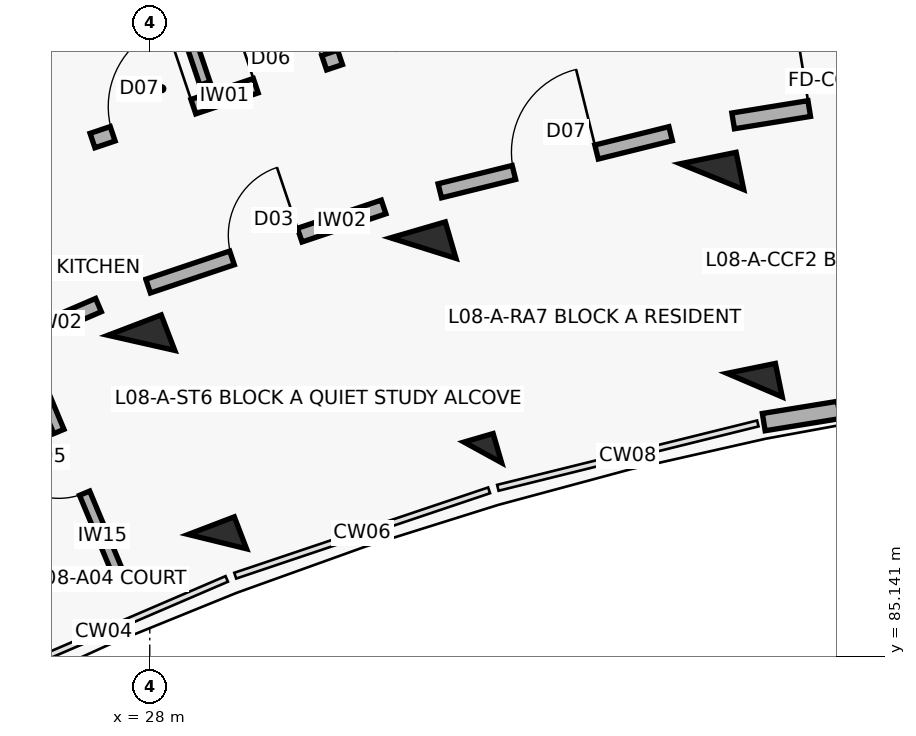
"""IFC4 building model, lengths in metres.
Left out: names, types, materials, properties, quantities, classifications, styles, units other than length and angle.
Written with IfcOpenShell. Run it as: python <this file> out.ifc"""

import sys

from ifc_helpers import new_model, si_unit, direction, frame, frame_2d, origin, origin_2d, place, context, subcontext, project, spatial, rectangle, extrude, element, fill, save


model = new_model("IFC4")
c1 = context("Model", 3, precision=1e-05, world=origin(), true_north=direction((0.0, 1.0)))
c2 = subcontext(c1, "Body", "Model", "MODEL_VIEW")
j1 = project(units=[si_unit("LENGTHUNIT", "METRE"), si_unit("PLANEANGLEUNIT", "RADIAN")], contexts=[c1])
p1 = place(None, origin())
s1 = spatial("IfcSite", under=j1, at=p1, CompositionType="ELEMENT")
p2 = place(p1, origin())
s2 = spatial("IfcBuilding", under=s1, at=p2, CompositionType="ELEMENT")
p3 = place(p2, frame((0.0, 0.0, 26.7)))
s3 = spatial("IfcBuildingStorey", under=s2, at=p3, CompositionType="ELEMENT", Elevation=26.7)
p4 = place(p3, frame((28.889, 86.646, 0.0), z_axis=(0.0, 0.0, 1.0), x_axis=(-0.357064076459, 0.934079892355, 0.0)))
e1 = element("IfcColumn", 1, at=p4, inside=s3, PredefinedType="COLUMN", context=c2, shape_type="SweptSolid", body=[
    extrude(rectangle(XDim=0.45, YDim=0.65, at=origin_2d()), origin(), (0.0, 0.0, 1.0), 3.1),
])
p5 = place(p3, frame((27.889, 89.261, 0.0), z_axis=(0.0, 0.0, 1.0), x_axis=(-0.357064076459, 0.934079892355, 0.0)))
e2 = element("IfcColumn", 2, at=p5, inside=s3, PredefinedType="COLUMN", context=c2, shape_type="SweptSolid", body=[
    extrude(rectangle(XDim=0.5, YDim=0.75, at=origin_2d()), origin(), (0.0, 0.0, 1.0), 3.1),
])
p6 = place(p3, frame((32.382, 87.82, 0.0), z_axis=(0.0, 0.0, 1.0), x_axis=(-0.27966144946, 0.96009867914, 0.0)))
e3 = element("IfcColumn", 3, at=p6, inside=s3, PredefinedType="COLUMN", context=c2, shape_type="SweptSolid", body=[
    extrude(rectangle(XDim=0.4, YDim=0.4, at=origin_2d()), origin(), (0.0, 0.0, 1.0), 3.1),
])
p7 = place(p3, frame((31.599, 90.508, 0.0), z_axis=(0.0, 0.0, 1.0), x_axis=(-0.27966144946, 0.96009867914, 0.0)))
e4 = element("IfcColumn", 4, at=p7, inside=s3, PredefinedType="COLUMN", context=c2, shape_type="SweptSolid", body=[
    extrude(rectangle(XDim=0.5, YDim=0.75, at=origin_2d()), origin(), (0.0, 0.0, 1.0), 3.1),
])
p8 = place(p3, frame((35.958, 88.705, 0.0), z_axis=(0.0, 0.0, 1.0), x_axis=(-0.200393999665, 0.979715389742, 0.0)))
e5 = element("IfcColumn", 5, at=p8, inside=s3, PredefinedType="COLUMN", context=c2, shape_type="SweptSolid", body=[
    extrude(rectangle(XDim=0.45, YDim=0.65, at=origin_2d()), origin(), (0.0, 0.0, 1.0), 3.1),
])
p9 = place(p3, frame((35.397, 91.448, 0.0), z_axis=(0.0, 0.0, 1.0), x_axis=(-0.200393999665, 0.979715389742, 0.0)))
e6 = element("IfcColumn", 6, at=p9, inside=s3, PredefinedType="COLUMN", context=c2, shape_type="SweptSolid", body=[
    extrude(rectangle(XDim=0.5, YDim=0.75, at=origin_2d()), origin(), (0.0, 0.0, 1.0), 3.1),
])
p10 = place(p3, frame((36.078, 88.218, 0.0), z_axis=(0.0, 0.0, 1.0), x_axis=(0.987080874485, 0.160222804952, 0.0)))
e7 = element("IfcWall", 7, at=p10, inside=s3, PredefinedType="SOLIDWALL", context=c2, shape_type="SweptSolid", body=[
    extrude(rectangle(XDim=3.604, YDim=0.23, at=frame_2d((1.802, 0.0))), origin(), (0.0, 0.0, 1.0), 2.25),
])
p11 = place(p10, frame((1.002, 0.0, 0.32)))
e8 = element("IfcOpeningElement", 8, at=p11, cuts=e7, PredefinedType="OPENING", context=c2, shape_type="SweptSolid", body=[
    extrude(rectangle(XDim=1.6, YDim=1.5, at=frame_2d((0.8, 0.75))), frame((0.0, 0.125, 0.0), z_axis=(0.0, -1.0, 0.0), x_axis=(1.0, 0.0, 0.0)), (0.0, 0.0, 1.0), 0.25),
])
p12 = place(p3, frame((24.322, 88.467, 0.0), z_axis=(0.0, 0.0, 1.0), x_axis=(0.918723391052, 0.394901672235, 0.0)))
e9 = element("IfcWall", 9, at=p12, inside=s3, PredefinedType="SOLIDWALL", context=c2, shape_type="SweptSolid", body=[
    extrude(rectangle(XDim=3.269, YDim=0.19, at=frame_2d((1.634, 0.0))), origin(), (0.0, 0.0, 1.0), 2.08),
])
p13 = place(p12, frame((1.174, 0.0, 0.0)))
e10 = element("IfcOpeningElement", 10, at=p13, cuts=e9, PredefinedType="OPENING", context=c2, shape_type="SweptSolid", body=[
    extrude(rectangle(XDim=0.92, YDim=2.1, at=frame_2d((0.46, 1.05))), frame((0.0, 0.105, 0.0), z_axis=(0.0, -1.0, 0.0), x_axis=(1.0, 0.0, 0.0)), (0.0, 0.0, 1.0), 0.21),
])
p14 = place(p3, frame((27.609, 86.166, 0.0), z_axis=(0.0, 0.0, 1.0), x_axis=(-0.385151143297, 0.922853507777, 0.0)))
e11 = element("IfcWall", 11, at=p14, inside=s3, PredefinedType="PARTITIONING", context=c2, shape_type="SweptSolid", body=[
    extrude(rectangle(XDim=3.3, YDim=0.145, at=frame_2d((1.65, 0.0))), origin(), (0.0, 0.0, 1.0), 2.08),
])
p15 = place(p14, frame((1.21, 0.0, 0.0)))
e12 = element("IfcOpeningElement", 12, at=p15, cuts=e11, PredefinedType="OPENING", context=c2, shape_type="SweptSolid", body=[
    extrude(rectangle(XDim=0.88, YDim=2.1, at=frame_2d((0.44, 1.05))), frame((0.0, 0.083, 0.0), z_axis=(0.0, -1.0, 0.0), x_axis=(1.0, 0.0, 0.0)), (0.0, 0.0, 1.0), 0.165),
])
p16 = place(p3, frame((27.247, 91.923, 0.0), z_axis=(0.0, 0.0, 1.0), x_axis=(0.947863007629, 0.318678080151, 0.0)))
e13 = element("IfcWall", 13, at=p16, inside=s3, PredefinedType="SOLIDWALL", context=c2, shape_type="SweptSolid", body=[
    extrude(rectangle(XDim=3.436, YDim=0.2, at=frame_2d((1.718, 0.0))), origin(), (0.0, 0.0, 1.0), 2.08),
])
p17 = place(p16, frame((0.28, 0.0, 0.0)))
e14 = element("IfcOpeningElement", 14, at=p17, cuts=e13, PredefinedType="OPENING", context=c2, shape_type="SweptSolid", body=[
    extrude(rectangle(XDim=1.12, YDim=2.15, at=frame_2d((0.56, 1.075))), frame((0.0, 0.11, 0.0), z_axis=(0.0, -1.0, 0.0), x_axis=(1.0, 0.0, 0.0)), (0.0, 0.0, 1.0), 0.22),
])
p18 = place(p16, frame((2.266, 0.0, 0.0)))
e15 = element("IfcOpeningElement", 15, at=p18, cuts=e13, PredefinedType="OPENING", context=c2, shape_type="SweptSolid", body=[
    extrude(rectangle(XDim=0.95, YDim=2.1, at=frame_2d((0.475, 1.05))), frame((0.0, 0.11, 0.0), z_axis=(0.0, -1.0, 0.0), x_axis=(1.0, 0.0, 0.0)), (0.0, 0.0, 1.0), 0.22),
])
p19 = place(p3, frame((27.979, 90.008, 0.0), z_axis=(0.0, 0.0, 1.0), x_axis=(0.94787351033, 0.318646839643, 0.0)))
e16 = element("IfcWall", 16, at=p19, inside=s3, PredefinedType="SOLIDWALL", context=c2, shape_type="SweptSolid", body=[
    extrude(rectangle(XDim=3.269, YDim=0.19, at=frame_2d((1.634, 0.0))), origin(), (0.0, 0.0, 1.0), 2.08),
])
p20 = place(p19, frame((1.164, 0.0, 0.0)))
e17 = element("IfcOpeningElement", 17, at=p20, cuts=e16, PredefinedType="OPENING", context=c2, shape_type="SweptSolid", body=[
    extrude(rectangle(XDim=0.94, YDim=2.1, at=frame_2d((0.47, 1.05))), frame((0.0, 0.105, 0.0), z_axis=(0.0, -1.0, 0.0), x_axis=(1.0, 0.0, 0.0)), (0.0, 0.0, 1.0), 0.21),
])
p21 = place(p3, frame((28.725, 92.675, 0.0), z_axis=(0.0, 0.0, 1.0), x_axis=(-0.320057771325, 0.947398027766, 0.0)))
e18 = element("IfcWall", 18, at=p21, inside=s3, PredefinedType="PARTITIONING", context=c2, shape_type="SweptSolid", body=[
    extrude(rectangle(XDim=7.95, YDim=0.14, at=frame_2d((3.975, 0.0))), origin(), (0.0, 0.0, 1.0), 2.08),
])
p22 = place(p21, frame((6.05, 0.0, 0.0)))
e19 = element("IfcOpeningElement", 19, at=p22, cuts=e18, PredefinedType="OPENING", context=c2, shape_type="SweptSolid", body=[
    extrude(rectangle(XDim=0.92, YDim=2.1, at=frame_2d((0.46, 1.05))), frame((0.0, 0.08, 0.0), z_axis=(0.0, -1.0, 0.0), x_axis=(1.0, 0.0, 0.0)), (0.0, 0.0, 1.0), 0.16),
])
p23 = place(p3, frame((31.816, 91.262, 0.0), z_axis=(0.0, 0.0, 1.0), x_axis=(0.970727194092, 0.240184751078, 0.0)))
e20 = element("IfcWall", 20, at=p23, inside=s3, PredefinedType="SOLIDWALL", context=c2, shape_type="SweptSolid", body=[
    extrude(rectangle(XDim=3.129, YDim=0.19, at=frame_2d((1.564, 0.0))), origin(), (0.0, 0.0, 1.0), 2.08),
])
p24 = place(p23, frame((1.004, 0.0, 0.0)))
e21 = element("IfcOpeningElement", 21, at=p24, cuts=e20, PredefinedType="OPENING", context=c2, shape_type="SweptSolid", body=[
    extrude(rectangle(XDim=1.12, YDim=2.15, at=frame_2d((0.56, 1.075))), frame((0.0, 0.105, 0.0), z_axis=(0.0, -1.0, 0.0), x_axis=(1.0, 0.0, 0.0)), (0.0, 0.0, 1.0), 0.21),
])
p25 = place(p3, frame((35.676, 92.181, 0.0), z_axis=(0.0, 0.0, 1.0), x_axis=(0.98707079686, 0.160284877599, 0.0)))
e22 = element("IfcWall", 22, at=p25, inside=s3, PredefinedType="SOLIDWALL", context=c2, shape_type="SweptSolid", body=[
    extrude(rectangle(XDim=3.129, YDim=0.21, at=frame_2d((1.564, 0.0))), origin(), (0.0, 0.0, 1.0), 2.08),
])
p26 = place(p25, frame((1.014, 0.0, 0.0)))
e23 = element("IfcOpeningElement", 23, at=p26, cuts=e22, PredefinedType="OPENING", context=c2, shape_type="SweptSolid", body=[
    extrude(rectangle(XDim=1.1, YDim=2.15, at=frame_2d((0.55, 1.075))), frame((0.0, 0.115, 0.0), z_axis=(0.0, -1.0, 0.0), x_axis=(1.0, 0.0, 0.0)), (0.0, 0.0, 1.0), 0.23),
])
p27 = place(p15, origin())
e24 = element("IfcDoor", 24, at=p27, inside=s3, OperationType="SINGLE_SWING_RIGHT", PredefinedType="DOOR", context=c2, shape_type="SweptSolid", body=[
    extrude(rectangle(XDim=0.88, YDim=2.1, at=frame_2d((0.44, 1.05))), frame((0.0, 0.025, 0.0), z_axis=(0.0, -1.0, 0.0), x_axis=(1.0, 0.0, 0.0)), (0.0, 0.0, 1.0), 0.05),
])
fill(e12, e24)
p28 = place(p17, origin())
e25 = element("IfcDoor", 25, at=p28, inside=s3, OperationType="SINGLE_SWING_RIGHT", PredefinedType="DOOR", context=c2, shape_type="SweptSolid", body=[
    extrude(rectangle(XDim=1.12, YDim=2.15, at=frame_2d((0.56, 1.075))), frame((0.0, 0.025, 0.0), z_axis=(0.0, -1.0, 0.0), x_axis=(1.0, 0.0, 0.0)), (0.0, 0.0, 1.0), 0.05),
])
fill(e14, e25)
p29 = place(p18, origin())
e26 = element("IfcDoor", 26, at=p29, inside=s3, OperationType="SINGLE_SWING_LEFT", PredefinedType="DOOR", context=c2, shape_type="SweptSolid", body=[
    extrude(rectangle(XDim=0.95, YDim=2.1, at=frame_2d((0.475, 1.05))), frame((0.0, 0.025, 0.0), z_axis=(0.0, -1.0, 0.0), x_axis=(1.0, 0.0, 0.0)), (0.0, 0.0, 1.0), 0.05),
])
fill(e15, e26)
p30 = place(p20, origin())
e27 = element("IfcDoor", 27, at=p30, inside=s3, OperationType="SINGLE_SWING_RIGHT", PredefinedType="DOOR", context=c2, shape_type="SweptSolid", body=[
    extrude(rectangle(XDim=0.94, YDim=2.1, at=frame_2d((0.47, 1.05))), frame((0.0, 0.025, 0.0), z_axis=(0.0, -1.0, 0.0), x_axis=(1.0, 0.0, 0.0)), (0.0, 0.0, 1.0), 0.05),
])
fill(e17, e27)
p31 = place(p24, origin())
e28 = element("IfcDoor", 28, at=p31, inside=s3, OperationType="SINGLE_SWING_RIGHT", PredefinedType="DOOR", context=c2, shape_type="SweptSolid", body=[
    extrude(rectangle(XDim=1.12, YDim=2.15, at=frame_2d((0.56, 1.075))), frame((0.0, 0.025, 0.0), z_axis=(0.0, -1.0, 0.0), x_axis=(1.0, 0.0, 0.0)), (0.0, 0.0, 1.0), 0.05),
])
fill(e21, e28)
p32 = place(p26, origin())
e29 = element("IfcDoor", 29, at=p32, inside=s3, OperationType="SINGLE_SWING_LEFT", PredefinedType="DOOR", context=c2, shape_type="SweptSolid", body=[
    extrude(rectangle(XDim=1.1, YDim=2.15, at=frame_2d((0.55, 1.075))), frame((0.0, 0.025, 0.0), z_axis=(0.0, -1.0, 0.0), x_axis=(1.0, 0.0, 0.0)), (0.0, 0.0, 1.0), 0.05),
])
fill(e23, e29)
save(model, sys.argv[1])
